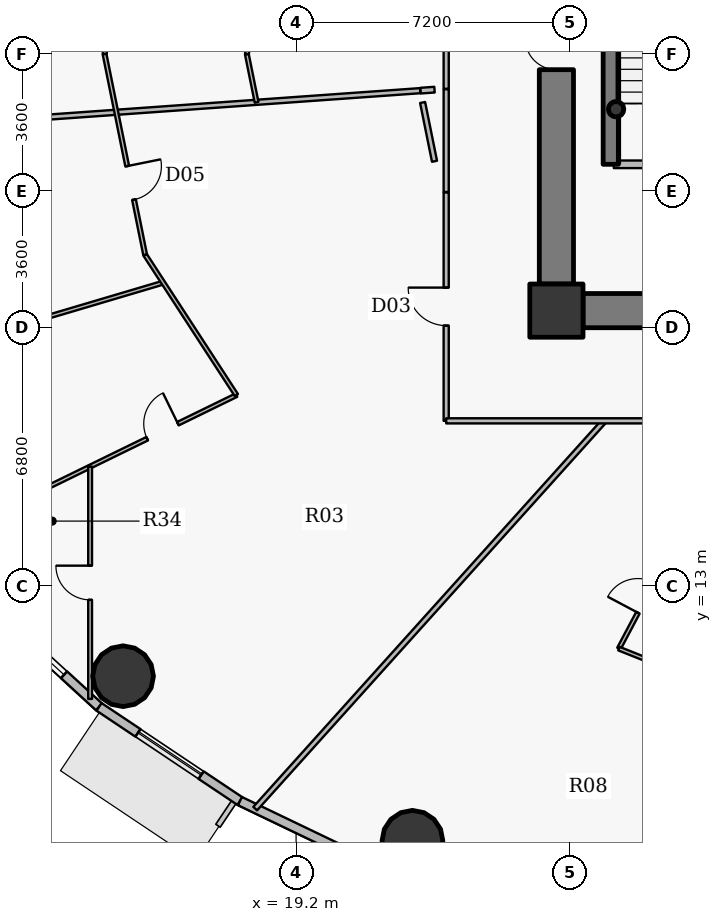
"""IFC4 building model, lengths in metres.
Left out: names, types, materials, properties, quantities, classifications, styles, units other than length and angle.
Written with IfcOpenShell. Run it as: python <this file> out.ifc"""

import sys

from ifc_helpers import new_model, si_unit, direction, frame, frame_2d, origin, origin_2d, place, context, subcontext, project, spatial, rectangle, hollow_circle, extrude, source, transform, mapped, element, fill, save


model = new_model("IFC4")
c1 = context("Model", 3, precision=1e-05, world=origin(), true_north=direction((0.0, 1.0)))
c2 = subcontext(c1, "Body", "Model", "MODEL_VIEW")
j1 = project(units=[si_unit("LENGTHUNIT", "METRE"), si_unit("PLANEANGLEUNIT", "RADIAN")], contexts=[c1])
p1 = place(None, origin())
s1 = spatial("IfcSite", under=j1, at=p1, CompositionType="ELEMENT")
p2 = place(p1, origin())
s2 = spatial("IfcBuilding", under=s1, at=p2, CompositionType="ELEMENT")
p3 = place(p2, frame((0.0, 0.0, 61.8)))
s3 = spatial("IfcBuildingStorey", under=s2, at=p3, CompositionType="ELEMENT", Elevation=61.8)
p4 = place(p3, frame((26.05, 20.25, 0.0), z_axis=(0.0, 0.0, 1.0), x_axis=(1.0, 0.0, 0.0)))
e1 = element("IfcColumn", 1, at=p4, inside=s3, PredefinedType="COLUMN", context=c2, shape_type="SweptSolid", body=[
    extrude(rectangle(XDim=1.4, YDim=1.4, at=origin_2d()), origin(), (0.0, 0.0, 1.0), 4.2),
])
p5 = place(p3, frame((27.48, 24.1, 0.0), z_axis=(0.0, 0.0, 1.0), x_axis=(0.0, 1.0, 0.0)))
e2 = element("IfcWall", 2, at=p5, inside=s3, PredefinedType="SHEAR", context=c2, shape_type="SweptSolid", body=[
    extrude(rectangle(XDim=8.6, YDim=0.4, at=frame_2d((4.3, 0.0))), origin(), (0.0, 0.0, 1.0), 4.2),
])
p6 = place(p3, frame((27.62, 25.55, 0.0), z_axis=(0.0, 0.0, 1.0), x_axis=(1.0, 0.0, 0.0)))
e3 = element("IfcColumn", 3, at=p6, inside=s3, PredefinedType="COLUMN", context=c2, shape_type="SweptSolid", body=[
    extrude(hollow_circle(Radius=0.203, WallThickness=0.016, at=origin_2d()), origin(), (0.0, 0.0, 1.0), 4.2),
])
p7 = place(p3, frame((45.25, 20.25, 0.0), z_axis=(0.0, 0.0, 1.0), x_axis=(-1.0, 0.0, 0.0)))
e4 = element("IfcWall", 4, at=p7, inside=s3, PredefinedType="SHEAR", context=c2, shape_type="SweptSolid", body=[
    extrude(rectangle(XDim=18.5, YDim=0.9, at=frame_2d((9.25, 0.0))), origin(), (0.0, 0.0, 1.0), 3.4),
])
p8 = place(p7, frame((10.0, 0.0, 0.0)))
e5 = element("IfcOpeningElement", 5, at=p8, cuts=e4, PredefinedType="OPENING", context=c2, shape_type="SweptSolid", body=[
    extrude(rectangle(XDim=1.15, YDim=2.15, at=origin_2d()), frame((0.575, 0.46, 1.075), z_axis=(0.0, -1.0, 0.0), x_axis=(1.0, 0.0, 0.0)), (0.0, 0.0, 1.0), 0.92),
])
p9 = place(p3, frame((26.05, 20.95, 0.0), z_axis=(0.0, 0.0, 1.0), x_axis=(0.0, 1.0, 0.0)))
e6 = element("IfcWall", 6, at=p9, inside=s3, PredefinedType="SHEAR", context=c2, shape_type="SweptSolid", body=[
    extrude(rectangle(XDim=12.1, YDim=0.9, at=frame_2d((6.05, 0.0))), origin(), (0.0, 0.0, 1.0), 3.4),
])
p10 = place(p9, frame((5.64, 0.0, 0.0)))
e7 = element("IfcOpeningElement", 7, at=p10, cuts=e6, PredefinedType="OPENING", context=c2, shape_type="SweptSolid", body=[
    extrude(rectangle(XDim=0.82, YDim=2.1, at=origin_2d()), frame((0.41, 0.46, 1.05), z_axis=(0.0, -1.0, 0.0), x_axis=(1.0, 0.0, 0.0)), (0.0, 0.0, 1.0), 0.92),
])
for number, where, z_axis, x_axis in (
    (8, (14.647, 10.631, 0.0), (0.0, 0.0, 1.0), (1.0, 0.0, 0.0)),
    (9, (22.262, 6.301, 0.0), (0.0, 0.0, 1.0), (1.0, 0.0, 0.0)),
):
    element("IfcColumn", number, at=place(p3, frame(where, z_axis=z_axis, x_axis=x_axis)), inside=s3, PredefinedType="COLUMN", context=c2, shape_type="SweptSolid", body=[
        extrude(hollow_circle(Radius=0.8, WallThickness=0.045, at=origin_2d()), origin(), (0.0, 0.0, 1.0), 4.2),
    ])
p11 = place(p3, frame((14.015, 9.824, 0.0), z_axis=(0.0, 0.0, 1.0), x_axis=(-0.737116376281, 0.67576582321, 0.0)))
e10 = element("IfcWall", 10, at=p11, inside=s3, PredefinedType="SOLIDWALL", context=c2, shape_type="SweptSolid", body=[
    extrude(rectangle(XDim=4.294, YDim=0.24, at=frame_2d((2.147, 0.0))), origin(), (0.0, 0.0, 1.0), 3.95),
])
p12 = place(p11, frame((1.25, 0.0, 0.9)))
e11 = element("IfcOpeningElement", 11, at=p12, cuts=e10, PredefinedType="OPENING", context=c2, shape_type="SweptSolid", body=[
    extrude(rectangle(XDim=1.25, YDim=1.65, at=origin_2d()), frame((0.625, 0.13, 0.825), z_axis=(0.0, -1.0, 0.0), x_axis=(1.0, 0.0, 0.0)), (0.0, 0.0, 1.0), 0.26),
])
p13 = place(p3, frame((17.723, 7.344, 0.0), z_axis=(0.0, 0.0, 1.0), x_axis=(-0.831240982525, 0.555912249343, 0.0)))
e12 = element("IfcWall", 12, at=p13, inside=s3, PredefinedType="SOLIDWALL", context=c2, shape_type="SweptSolid", body=[
    extrude(rectangle(XDim=4.46, YDim=0.24, at=frame_2d((2.23, 0.0))), origin(), (0.0, 0.0, 1.0), 3.95),
])
p14 = place(p13, frame((1.23, 0.0, 0.9)))
e13 = element("IfcOpeningElement", 13, at=p14, cuts=e12, PredefinedType="OPENING", context=c2, shape_type="SweptSolid", body=[
    extrude(rectangle(XDim=2.0, YDim=1.75, at=origin_2d()), frame((1.0, 0.13, 0.875), z_axis=(0.0, -1.0, 0.0), x_axis=(1.0, 0.0, 0.0)), (0.0, 0.0, 1.0), 0.26),
])
p15 = place(p3, frame((21.882, 5.349, 0.0), z_axis=(0.0, 0.0, 1.0), x_axis=(-0.901601503137, 0.432567601123, 0.0)))
e14 = element("IfcWall", 14, at=p15, inside=s3, PredefinedType="SOLIDWALL", context=c2, shape_type="SweptSolid", body=[
    extrude(rectangle(XDim=4.613, YDim=0.24, at=frame_2d((2.306, 0.0))), origin(), (0.0, 0.0, 1.0), 3.95),
])
p16 = place(p3, frame((5.141, 24.805, 0.0), z_axis=(0.0, 0.0, 1.0), x_axis=(0.99748069861, 0.070938395112, 0.0)))
e15 = element("IfcWall", 15, at=p16, inside=s3, PredefinedType="PARTITIONING", context=c2, shape_type="SweptSolid", body=[
    extrude(rectangle(XDim=17.37, YDim=0.135, at=frame_2d((8.685, 0.0))), origin(), (0.0, 0.0, 1.0), 3.335),
])
p17 = place(p3, frame((7.012, 18.411, 0.0), z_axis=(0.0, 0.0, 1.0), x_axis=(0.958797025861, 0.284091997775, 0.0)))
e16 = element("IfcWall", 16, at=p17, inside=s3, PredefinedType="PARTITIONING", context=c2, shape_type="SweptSolid", body=[
    extrude(rectangle(XDim=9.065, YDim=0.1, at=frame_2d((4.532, 0.0))), origin(), (0.0, 0.0, 1.0), 3.335),
])
p18 = place(p3, frame((9.719, 14.163, 0.0), z_axis=(0.0, 0.0, 1.0), x_axis=(0.898526567573, 0.438919135339, 0.0)))
e17 = element("IfcWall", 17, at=p18, inside=s3, PredefinedType="PARTITIONING", context=c2, shape_type="SweptSolid", body=[
    extrude(rectangle(XDim=8.803, YDim=0.1, at=frame_2d((4.402, 0.0))), origin(), (0.0, 0.0, 1.0), 3.335),
])
p19 = place(p18, frame((6.191, 0.0, 0.0)))
e18 = element("IfcOpeningElement", 18, at=p19, cuts=e17, PredefinedType="OPENING", context=c2, shape_type="SweptSolid", body=[
    extrude(rectangle(XDim=0.9, YDim=2.1, at=origin_2d()), frame((0.45, 0.06, 1.05), z_axis=(0.0, -1.0, 0.0), x_axis=(1.0, 0.0, 0.0)), (0.0, 0.0, 1.0), 0.12),
])
p20 = place(p18, frame((0.843, 0.0, 0.0)))
e19 = element("IfcOpeningElement", 19, at=p20, cuts=e17, PredefinedType="OPENING", context=c2, shape_type="SweptSolid", body=[
    extrude(rectangle(XDim=0.82, YDim=2.1, at=origin_2d()), frame((0.41, 0.06, 1.05), z_axis=(0.0, -1.0, 0.0), x_axis=(1.0, 0.0, 0.0)), (0.0, 0.0, 1.0), 0.12),
])
p21 = place(p3, frame((13.78, 10.033, 0.0), z_axis=(0.0, 0.0, 1.0), x_axis=(0.0, 1.0, 0.0)))
e20 = element("IfcWall", 20, at=p21, inside=s3, PredefinedType="PARTITIONING", context=c2, shape_type="SweptSolid", body=[
    extrude(rectangle(XDim=6.114, YDim=0.1, at=frame_2d((3.057, 0.0))), origin(), (0.0, 0.0, 1.0), 3.335),
])
p22 = place(p21, frame((2.607, 0.0, 0.0)))
e21 = element("IfcOpeningElement", 21, at=p22, cuts=e20, PredefinedType="OPENING", context=c2, shape_type="SweptSolid", body=[
    extrude(rectangle(XDim=0.9, YDim=2.1, at=origin_2d()), frame((0.45, 0.06, 1.05), z_axis=(0.0, -1.0, 0.0), x_axis=(1.0, 0.0, 0.0)), (0.0, 0.0, 1.0), 0.12),
])
p23 = place(p3, frame((14.16, 27.0, 0.0), z_axis=(0.0, 0.0, 1.0), x_axis=(0.198288618329, 0.980143675101, 0.0)))
e22 = element("IfcWall", 22, at=p23, inside=s3, PredefinedType="PARTITIONING", context=c2, shape_type="SweptSolid", body=[
    extrude(rectangle(XDim=3.781, YDim=0.1, at=frame_2d((1.891, 0.0))), origin(), (0.0, 0.0, 1.0), 3.285),
])
p24 = place(p23, frame((1.44, 0.0, 0.0)))
e23 = element("IfcOpeningElement", 23, at=p24, cuts=e22, PredefinedType="OPENING", context=c2, shape_type="SweptSolid", body=[
    extrude(rectangle(XDim=0.9, YDim=2.1, at=origin_2d()), frame((0.45, 0.06, 1.05), z_axis=(0.0, -1.0, 0.0), x_axis=(1.0, 0.0, 0.0)), (0.0, 0.0, 1.0), 0.12),
])
p25 = place(p3, frame((14.16, 27.0, 0.0), z_axis=(0.0, 0.0, 1.0), x_axis=(0.198292702032, -0.980142848936, 0.0)))
e24 = element("IfcWall", 24, at=p25, inside=s3, PredefinedType="PARTITIONING", context=c2, shape_type="SweptSolid", body=[
    extrude(rectangle(XDim=5.392, YDim=0.1, at=frame_2d((2.696, 0.0))), origin(), (0.0, 0.0, 1.0), 3.285),
])
p26 = place(p25, frame((3.007, 0.0, 0.0)))
e25 = element("IfcOpeningElement", 25, at=p26, cuts=e24, PredefinedType="OPENING", context=c2, shape_type="SweptSolid", body=[
    extrude(rectangle(XDim=0.9, YDim=2.1, at=origin_2d()), frame((0.45, 0.06, 1.05), z_axis=(0.0, -1.0, 0.0), x_axis=(1.0, 0.0, 0.0)), (0.0, 0.0, 1.0), 0.12),
])
p27 = place(p3, frame((15.229, 21.716, 0.0), z_axis=(0.0, 0.0, 1.0), x_axis=(0.545423102052, -0.838160867464, 0.0)))
e26 = element("IfcWall", 26, at=p27, inside=s3, PredefinedType="PARTITIONING", context=c2, shape_type="SweptSolid", body=[
    extrude(rectangle(XDim=4.401, YDim=0.1, at=frame_2d((2.2, 0.0))), origin(), (0.0, 0.0, 1.0), 3.285),
])
p28 = place(p3, frame((17.904, 27.0, 0.0), z_axis=(0.0, 0.0, 1.0), x_axis=(0.198255955876, -0.980150282334, 0.0)))
e27 = element("IfcWall", 27, at=p28, inside=s3, PredefinedType="PARTITIONING", context=c2, shape_type="SweptSolid", body=[
    extrude(rectangle(XDim=1.294, YDim=0.1, at=frame_2d((0.647, 0.0))), origin(), (0.0, 0.0, 1.0), 3.285),
])
p29 = place(p3, frame((17.904, 27.0, 0.0), z_axis=(0.0, 0.0, 1.0), x_axis=(0.198258794433, 0.980149708172, 0.0)))
e28 = element("IfcWall", 28, at=p29, inside=s3, PredefinedType="PARTITIONING", context=c2, shape_type="SweptSolid", body=[
    extrude(rectangle(XDim=3.133, YDim=0.1, at=frame_2d((1.566, 0.0))), origin(), (0.0, 0.0, 1.0), 3.285),
])
p30 = place(p3, frame((18.124, 7.146, 0.0), z_axis=(0.0, 0.0, 1.0), x_axis=(0.669125827692, 0.743149128181, 0.0)))
e29 = element("IfcWall", 29, at=p30, inside=s3, PredefinedType="PARTITIONING", context=c2, shape_type="SweptSolid", body=[
    extrude(rectangle(XDim=13.73, YDim=0.135, at=frame_2d((6.865, 0.0))), origin(), (0.0, 0.0, 1.0), 3.335),
])
p31 = place(p3, frame((23.15, 17.35, 0.0), z_axis=(0.0, 0.0, 1.0), x_axis=(0.0, 1.0, 0.0)))
e30 = element("IfcWall", 30, at=p31, inside=s3, PredefinedType="PARTITIONING", context=c2, shape_type="SweptSolid", body=[
    extrude(rectangle(XDim=6.011, YDim=0.135, at=frame_2d((3.006, 0.0))), origin(), (0.0, 0.0, 1.0), 3.285),
])
p32 = place(p31, frame((2.506, 0.0, 0.0)))
e31 = element("IfcOpeningElement", 31, at=p32, cuts=e30, PredefinedType="OPENING", context=c2, shape_type="SweptSolid", body=[
    extrude(rectangle(XDim=1.0, YDim=2.15, at=origin_2d()), frame((0.5, 0.078, 1.075), z_axis=(0.0, -1.0, 0.0), x_axis=(1.0, 0.0, 0.0)), (0.0, 0.0, 1.0), 0.155),
])
p33 = place(p3, frame((23.15, 17.35, 0.0), z_axis=(0.0, 0.0, 1.0), x_axis=(1.0, 0.0, 0.0)))
e32 = element("IfcWall", 32, at=p33, inside=s3, PredefinedType="PARTITIONING", context=c2, shape_type="SweptSolid", body=[
    extrude(rectangle(XDim=10.456, YDim=0.135, at=frame_2d((5.228, 0.0))), origin(), (0.0, 0.0, 1.0), 3.285),
])
p34 = place(p33, frame((5.444, 0.0, 0.0)))
e33 = element("IfcOpeningElement", 33, at=p34, cuts=e32, PredefinedType="OPENING", context=c2, shape_type="SweptSolid", body=[
    extrude(rectangle(XDim=1.0, YDim=2.15, at=origin_2d()), frame((0.5, 0.078, 1.075), z_axis=(0.0, -1.0, 0.0), x_axis=(1.0, 0.0, 0.0)), (0.0, 0.0, 1.0), 0.155),
])
p35 = place(p3, frame((23.15, 26.086, 0.0), z_axis=(0.0, 0.0, 1.0), x_axis=(0.0, 1.0, 0.0)))
e34 = element("IfcWall", 34, at=p35, inside=s3, PredefinedType="PARTITIONING", context=c2, shape_type="SweptSolid", body=[
    extrude(rectangle(XDim=10.564, YDim=0.135, at=frame_2d((5.282, 0.0))), origin(), (0.0, 0.0, 1.0), 3.285),
])
p36 = place(p35, frame((4.403, 0.0, 0.0)))
e35 = element("IfcOpeningElement", 35, at=p36, cuts=e34, PredefinedType="OPENING", context=c2, shape_type="SweptSolid", body=[
    extrude(rectangle(XDim=1.0, YDim=2.15, at=origin_2d()), frame((0.5, 0.078, 1.075), z_axis=(0.0, -1.0, 0.0), x_axis=(1.0, 0.0, 0.0)), (0.0, 0.0, 1.0), 0.155),
])
p37 = place(p3, frame((27.56, 24.1, 0.0), z_axis=(0.0, 0.0, 1.0), x_axis=(1.0, 0.0, 0.0)))
e36 = element("IfcWall", 36, at=p37, inside=s3, PredefinedType="PARTITIONING", context=c2, shape_type="SweptSolid", body=[
    extrude(rectangle(XDim=3.54, YDim=0.2, at=frame_2d((1.77, 0.0))), origin(), (0.0, 0.0, 1.0), 3.95),
])
p38 = place(p37, frame((1.17, 0.0, 0.0)))
e37 = element("IfcOpeningElement", 37, at=p38, cuts=e36, PredefinedType="OPENING", context=c2, shape_type="SweptSolid", body=[
    extrude(rectangle(XDim=1.2, YDim=2.15, at=origin_2d()), frame((0.6, 0.11, 1.075), z_axis=(0.0, -1.0, 0.0), x_axis=(1.0, 0.0, 0.0)), (0.0, 0.0, 1.0), 0.22),
])
p39 = place(p3, frame((27.694, 11.357, 0.0), z_axis=(0.0, 0.0, 1.0), x_axis=(0.468918098925, 0.883241652381, 0.0)))
e38 = element("IfcWall", 38, at=p39, inside=s3, PredefinedType="PARTITIONING", context=c2, shape_type="SweptSolid", body=[
    extrude(rectangle(XDim=3.036, YDim=0.1, at=frame_2d((1.518, 0.0))), origin(), (0.0, 0.0, 1.0), 3.95),
])
p40 = place(p39, frame((1.068, 0.0, 0.0)))
e39 = element("IfcOpeningElement", 39, at=p40, cuts=e38, PredefinedType="OPENING", context=c2, shape_type="SweptSolid", body=[
    extrude(rectangle(XDim=0.9, YDim=2.1, at=origin_2d()), frame((0.45, 0.06, 1.05), z_axis=(0.0, -1.0, 0.0), x_axis=(1.0, 0.0, 0.0)), (0.0, 0.0, 1.0), 0.12),
])
p41 = place(p3, frame((27.694, 11.357, 0.0), z_axis=(0.0, 0.0, 1.0), x_axis=(0.928847957875, -0.370461160112, 0.0)))
e40 = element("IfcWall", 40, at=p41, inside=s3, PredefinedType="PARTITIONING", context=c2, shape_type="SweptSolid", body=[
    extrude(rectangle(XDim=1.676, YDim=0.1, at=frame_2d((0.838, 0.0))), origin(), (0.0, 0.0, 1.0), 3.95),
])
p42 = place(p3, frame((23.15, 23.372, 0.0), z_axis=(0.0, 0.0, 1.0), x_axis=(0.0, 1.0, 0.0)))
e41 = element("IfcWall", 41, at=p42, inside=s3, PredefinedType="PARTITIONING", context=c2, shape_type="SweptSolid", body=[
    extrude(rectangle(XDim=2.705, YDim=0.135, at=frame_2d((1.352, 0.0))), origin(), (0.0, 0.0, 1.0), 3.285),
])
p43 = place(p3, frame((25.6, 20.94, 0.0), z_axis=(0.0, 0.0, 1.0), x_axis=(0.0, -1.0, 0.0)))
e42 = element("IfcWall", 42, at=p43, inside=s3, PredefinedType="PARTITIONING", context=c2, shape_type="SweptSolid", body=[
    extrude(rectangle(XDim=1.14, YDim=0.135, at=frame_2d((0.57, 0.0))), origin(), (0.0, 0.0, 1.0), 3.95),
])
p44 = place(p3, frame((25.907, 19.8, 0.0), z_axis=(0.0, 0.0, 1.0), x_axis=(1.0, 0.0, 0.0)))
e43 = element("IfcWall", 43, at=p44, inside=s3, PredefinedType="PARTITIONING", context=c2, shape_type="SweptSolid", body=[
    extrude(rectangle(XDim=0.833, YDim=0.135, at=frame_2d((0.416, 0.0))), origin(), (0.0, 0.0, 1.0), 3.285),
])
p45 = place(p3, frame((22.843, 26.064, 0.0), z_axis=(0.0, 0.0, 1.0), x_axis=(-0.997509116352, -0.070537669335, 0.0)))
e44 = element("IfcWall", 44, at=p45, inside=s3, PredefinedType="PARTITIONING", context=c2, shape_type="SweptSolid", body=[
    extrude(rectangle(XDim=0.367, YDim=0.15, at=frame_2d((0.184, 0.0))), origin(), (0.0, 0.0, 1.0), 3.95),
])
p46 = place(p3, frame((22.53, 25.726, 0.0), z_axis=(0.0, 0.0, 1.0), x_axis=(0.198347121698, -0.980131837721, 0.0)))
e45 = element("IfcWall", 45, at=p46, inside=s3, PredefinedType="PARTITIONING", context=c2, shape_type="SweptSolid", body=[
    extrude(rectangle(XDim=1.578, YDim=0.135, at=frame_2d((0.789, 0.0))), origin(), (0.0, 0.0, 1.0), 3.95),
])
m1 = source(origin(), c2, "Body", "SweptSolid", [
    extrude(rectangle(XDim=1.25, YDim=1.65, at=origin_2d()), frame((0.625, 0.03, 0.825), z_axis=(0.0, -1.0, 0.0), x_axis=(1.0, 0.0, 0.0)), (0.0, 0.0, 1.0), 0.06),
])
p47 = place(p12, origin())
e46 = element("IfcWindow", 46, at=p47, inside=s3, PartitioningType="SINGLE_PANEL", PredefinedType="WINDOW", context=c2, shape_type="MappedRepresentation", body=[
    mapped(m1, transform((0.0, 0.0, 0.0), x_axis=(1.0, 0.0, 0.0), y_axis=(0.0, 1.0, 0.0), z_axis=(0.0, 0.0, 1.0), scale=1.0)),
])
fill(e11, e46)
m2 = source(origin(), c2, "Body", "SweptSolid", [
    extrude(rectangle(XDim=2.0, YDim=1.75, at=origin_2d()), frame((1.0, 0.03, 0.875), z_axis=(0.0, -1.0, 0.0), x_axis=(1.0, 0.0, 0.0)), (0.0, 0.0, 1.0), 0.06),
])
p48 = place(p14, origin())
e47 = element("IfcWindow", 47, at=p48, inside=s3, PartitioningType="DOUBLE_PANEL_VERTICAL", PredefinedType="WINDOW", context=c2, shape_type="MappedRepresentation", body=[
    mapped(m2, transform((0.0, 0.0, 0.0), x_axis=(1.0, 0.0, 0.0), y_axis=(0.0, 1.0, 0.0), z_axis=(0.0, 0.0, 1.0), scale=1.0)),
])
fill(e13, e47)
m3 = source(origin(), c2, "Body", "SweptSolid", [
    extrude(rectangle(XDim=0.82, YDim=2.1, at=origin_2d()), frame((0.41, 0.025, 1.05), z_axis=(0.0, -1.0, 0.0), x_axis=(1.0, 0.0, 0.0)), (0.0, 0.0, 1.0), 0.05),
])
p49 = place(p10, origin())
e48 = element("IfcDoor", 48, at=p49, inside=s3, OperationType="SINGLE_SWING_RIGHT", PredefinedType="DOOR", context=c2, shape_type="MappedRepresentation", body=[
    mapped(m3, transform((0.0, 0.0, 0.0), x_axis=(1.0, 0.0, 0.0), y_axis=(0.0, 1.0, 0.0), z_axis=(0.0, 0.0, 1.0), scale=1.0)),
])
fill(e7, e48)
m4 = source(origin(), c2, "Body", "SweptSolid", [
    extrude(rectangle(XDim=1.0, YDim=2.15, at=origin_2d()), frame((0.5, 0.025, 1.075), z_axis=(0.0, -1.0, 0.0), x_axis=(1.0, 0.0, 0.0)), (0.0, 0.0, 1.0), 0.05),
])
p50 = place(p32, origin())
e49 = element("IfcDoor", 49, at=p50, inside=s3, OperationType="SINGLE_SWING_RIGHT", PredefinedType="DOOR", context=c2, shape_type="MappedRepresentation", body=[
    mapped(m4, transform((0.0, 0.0, 0.0), x_axis=(1.0, 0.0, 0.0), y_axis=(0.0, 1.0, 0.0), z_axis=(0.0, 0.0, 1.0), scale=1.0)),
])
fill(e31, e49)
m5 = source(origin(), c2, "Body", "SweptSolid", [
    extrude(rectangle(XDim=0.9, YDim=2.1, at=origin_2d()), frame((0.45, 0.025, 1.05), z_axis=(0.0, -1.0, 0.0), x_axis=(1.0, 0.0, 0.0)), (0.0, 0.0, 1.0), 0.05),
])
p51 = place(p26, origin())
e50 = element("IfcDoor", 50, at=p51, inside=s3, OperationType="SINGLE_SWING_LEFT", PredefinedType="DOOR", context=c2, shape_type="MappedRepresentation", body=[
    mapped(m5, transform((0.0, 0.0, 0.0), x_axis=(1.0, 0.0, 0.0), y_axis=(0.0, 1.0, 0.0), z_axis=(0.0, 0.0, 1.0), scale=1.0)),
])
fill(e25, e50)
p52 = place(p19, origin())
e51 = element("IfcDoor", 51, at=p52, inside=s3, OperationType="SINGLE_SWING_RIGHT", PredefinedType="DOOR", context=c2, shape_type="MappedRepresentation", body=[
    mapped(m5, transform((0.0, 0.0, 0.0), x_axis=(1.0, 0.0, 0.0), y_axis=(0.0, 1.0, 0.0), z_axis=(0.0, 0.0, 1.0), scale=1.0)),
])
fill(e18, e51)
p53 = place(p22, origin())
e52 = element("IfcDoor", 52, at=p53, inside=s3, OperationType="SINGLE_SWING_RIGHT", PredefinedType="DOOR", context=c2, shape_type="MappedRepresentation", body=[
    mapped(m5, transform((0.0, 0.0, 0.0), x_axis=(1.0, 0.0, 0.0), y_axis=(0.0, 1.0, 0.0), z_axis=(0.0, 0.0, 1.0), scale=1.0)),
])
fill(e21, e52)
p54 = place(p40, origin())
e53 = element("IfcDoor", 53, at=p54, inside=s3, OperationType="SINGLE_SWING_LEFT", PredefinedType="DOOR", context=c2, shape_type="MappedRepresentation", body=[
    mapped(m5, transform((0.0, 0.0, 0.0), x_axis=(1.0, 0.0, 0.0), y_axis=(0.0, 1.0, 0.0), z_axis=(0.0, 0.0, 1.0), scale=1.0)),
])
fill(e39, e53)
save(model, sys.argv[1])
